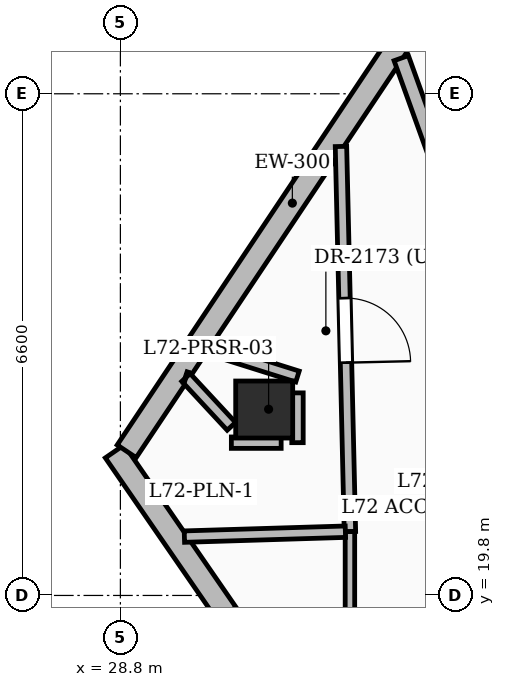
"""IFC4 building model, lengths in metres.
Left out: names, types, materials, properties, quantities, classifications, styles, units other than length and angle.
Written with IfcOpenShell. Run it as: python <this file> out.ifc"""

import sys

from ifc_helpers import new_model, si_unit, direction, frame, frame_2d, origin, origin_2d, place, context, subcontext, project, spatial, rectangle, extrude, element, fill, save


model = new_model("IFC4")
c1 = context("Model", 3, precision=1e-05, world=origin(), true_north=direction((0.0, 1.0)))
c2 = subcontext(c1, "Body", "Model", "MODEL_VIEW")
j1 = project(units=[si_unit("LENGTHUNIT", "METRE"), si_unit("PLANEANGLEUNIT", "RADIAN")], contexts=[c1])
p1 = place(None, origin())
s1 = spatial("IfcSite", under=j1, at=p1, CompositionType="ELEMENT")
p2 = place(p1, origin())
s2 = spatial("IfcBuilding", under=s1, at=p2, CompositionType="ELEMENT")
p3 = place(p2, frame((0.0, 0.0, 278.25)))
s3 = spatial("IfcBuildingStorey", under=s2, at=p3, CompositionType="ELEMENT", Elevation=278.25)
p4 = place(p3, frame((30.692, 22.246, 0.0), z_axis=(0.0, 0.0, 1.0), x_axis=(1.0, 0.0, 0.0)))
e1 = element("IfcColumn", 1, at=p4, inside=s3, PredefinedType="COLUMN", context=c2, shape_type="SweptSolid", body=[
    extrude(rectangle(XDim=0.75, YDim=0.75, at=origin_2d()), origin(), (0.0, 0.0, 1.0), 3.75),
])
p5 = place(p3, frame((30.198, 19.56, 0.0), z_axis=(0.0, 0.0, 1.0), x_axis=(-0.567515168171, 0.82336294178, 0.0)))
e2 = element("IfcWall", 2, at=p5, inside=s3, PredefinedType="SOLIDWALL", context=c2, shape_type="SweptSolid", body=[
    extrude(rectangle(XDim=2.594, YDim=0.3, at=frame_2d((1.297, 0.0))), origin(), (0.0, 0.0, 1.0), 2.696),
])
p6 = place(p3, frame((28.883, 21.697, 0.0), z_axis=(0.0, 0.0, 1.0), x_axis=(0.555209579516, 0.831710480163, 0.0)))
e3 = element("IfcWall", 3, at=p6, inside=s3, PredefinedType="SOLIDWALL", context=c2, shape_type="SweptSolid", body=[
    extrude(rectangle(XDim=7.851, YDim=0.3, at=frame_2d((3.926, 0.0))), origin(), (0.0, 0.0, 1.0), 3.5),
])
p7 = place(p3, frame((31.702, 25.707, 0.0), z_axis=(0.0, 0.0, 1.0), x_axis=(0.023313343879, -0.999728207063, 0.0)))
e4 = element("IfcWall", 4, at=p7, inside=s3, PredefinedType="PARTITIONING", context=c2, shape_type="SweptSolid", body=[
    extrude(rectangle(XDim=5.069, YDim=0.15, at=frame_2d((2.534, 0.0))), origin(), (0.0, 0.0, 1.0), 2.691),
])
p8 = place(p7, frame((1.995, 0.0, 0.0)))
e5 = element("IfcOpeningElement", 5, at=p8, cuts=e4, PredefinedType="OPENING", context=c2, shape_type="SweptSolid", body=[
    extrude(rectangle(XDim=0.85, YDim=2.1, at=frame_2d((0.425, 1.05))), frame((0.0, 0.085, 0.0), z_axis=(0.0, -1.0, 0.0), x_axis=(1.0, 0.0, 0.0)), (0.0, 0.0, 1.0), 0.17),
])
p9 = place(p3, frame((31.82, 20.64, 0.0), z_axis=(0.0, 0.0, 1.0), x_axis=(0.0, -1.0, 0.0)))
e6 = element("IfcWall", 6, at=p9, inside=s3, PredefinedType="PARTITIONING", context=c2, shape_type="SweptSolid", body=[
    extrude(rectangle(XDim=1.22, YDim=0.125, at=frame_2d((0.61, 0.0))), origin(), (0.0, 0.0, 1.0), 3.5),
])
p10 = place(p3, frame((35.8, 17.68, 0.0), z_axis=(0.0, 0.0, 1.0), x_axis=(-0.338438811441, 0.94098840105, 0.0)))
e7 = element("IfcWall", 7, at=p10, inside=s3, PredefinedType="PARTITIONING", context=c2, shape_type="SweptSolid", body=[
    extrude(rectangle(XDim=9.765, YDim=0.2, at=frame_2d((4.883, 0.0))), origin(), (0.0, 0.0, 1.0), 2.685),
])
p11 = place(p3, frame((29.642, 20.574, 0.0), z_axis=(0.0, 0.0, 1.0), x_axis=(0.999533749868, 0.030533307633, 0.0)))
e8 = element("IfcWall", 8, at=p11, inside=s3, PredefinedType="PARTITIONING", context=c2, shape_type="SweptSolid", body=[
    extrude(rectangle(XDim=2.119, YDim=0.15, at=frame_2d((1.06, 0.0))), origin(), (0.0, 0.0, 1.0), 2.691),
])
p12 = place(p3, frame((29.901, 23.041, 0.0), z_axis=(0.0, 0.0, 1.0), x_axis=(0.757409961601, -0.652939622069, 0.0)))
e9 = element("IfcWall", 9, at=p12, inside=s3, PredefinedType="PARTITIONING", context=c2, shape_type="SweptSolid", body=[
    extrude(rectangle(XDim=0.009, YDim=0.15, at=frame_2d((0.005, 0.0))), origin(), (0.0, 0.0, 1.0), 3.5),
])
p13 = place(p3, frame((29.939, 23.055, 0.0), z_axis=(0.0, 0.0, 1.0), x_axis=(0.953830579819, -0.300345176425, 0.0)))
e10 = element("IfcWall", 10, at=p13, inside=s3, PredefinedType="PARTITIONING", context=c2, shape_type="SweptSolid", body=[
    extrude(rectangle(XDim=1.249, YDim=0.15, at=frame_2d((0.624, 0.0))), origin(), (0.0, 0.0, 1.0), 2.691),
])
p14 = place(p3, frame((31.13, 22.465, 0.0), z_axis=(0.0, 0.0, 1.0), x_axis=(0.0, -1.0, 0.0)))
e11 = element("IfcWall", 11, at=p14, inside=s3, PredefinedType="PARTITIONING", context=c2, shape_type="SweptSolid", body=[
    extrude(rectangle(XDim=0.655, YDim=0.15, at=frame_2d((0.328, 0.0))), origin(), (0.0, 0.0, 1.0), 2.835),
])
p15 = place(p3, frame((30.915, 21.81, 0.0), z_axis=(0.0, 0.0, 1.0), x_axis=(-1.0, 0.0, 0.0)))
e12 = element("IfcWall", 12, at=p15, inside=s3, PredefinedType="PARTITIONING", context=c2, shape_type="SweptSolid", body=[
    extrude(rectangle(XDim=0.655, YDim=0.15, at=frame_2d((0.328, 0.0))), origin(), (0.0, 0.0, 1.0), 2.691),
])
p16 = place(p3, frame((30.26, 22.025, 0.0), z_axis=(0.0, 0.0, 1.0), x_axis=(-0.680323017409, 0.732912404031, 0.0)))
e13 = element("IfcWall", 13, at=p16, inside=s3, PredefinedType="PARTITIONING", context=c2, shape_type="SweptSolid", body=[
    extrude(rectangle(XDim=0.877, YDim=0.15, at=frame_2d((0.439, 0.0))), origin(), (0.0, 0.0, 1.0), 3.5),
])
p17 = place(p3, frame((29.663, 22.668, 0.0), z_axis=(0.0, 0.0, 1.0), x_axis=(-0.951222818949, 0.308504698037, 0.0)))
e14 = element("IfcWall", 14, at=p17, inside=s3, PredefinedType="PARTITIONING", context=c2, shape_type="SweptSolid", body=[
    extrude(rectangle(XDim=0.01, YDim=0.15, at=frame_2d((0.005, 0.0))), origin(), (0.0, 0.0, 1.0), 3.5),
])
p18 = place(p8, origin())
e15 = element("IfcDoor", 15, at=p18, inside=s3, OperationType="SINGLE_SWING_RIGHT", PredefinedType="DOOR", context=c2, shape_type="SweptSolid", body=[
    extrude(rectangle(XDim=0.85, YDim=2.1, at=frame_2d((0.425, 1.05))), frame((0.0, 0.025, 0.0), z_axis=(0.0, -1.0, 0.0), x_axis=(1.0, 0.0, 0.0)), (0.0, 0.0, 1.0), 0.05),
])
fill(e5, e15)
save(model, sys.argv[1])
